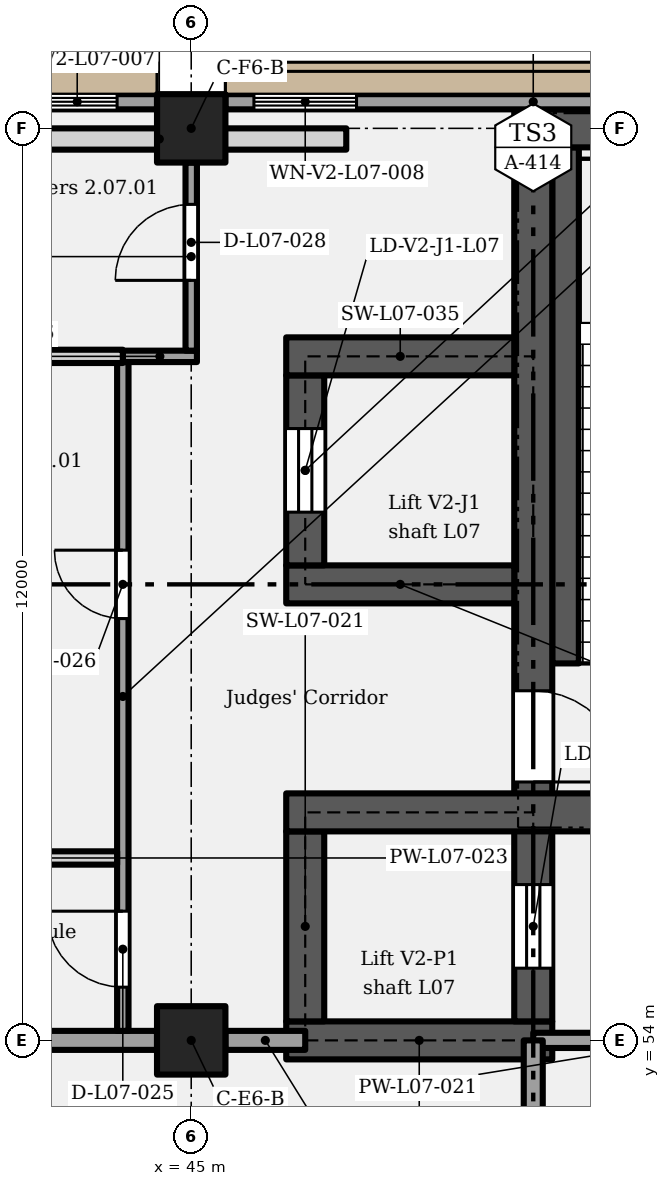
"""IFC4 building model, lengths in metres.
Left out: names, types, materials, properties, quantities, classifications, styles, units other than length and angle.
Written with IfcOpenShell. Run it as: python <this file> out.ifc"""

import sys

from ifc_helpers import new_model, si_unit, direction, frame, frame_2d, origin, origin_2d, place, context, subcontext, project, spatial, rectangle, extrude, element, fill, save


model = new_model("IFC4")
c1 = context("Model", 3, precision=1e-05, world=origin(), true_north=direction((0.0, 1.0)))
c2 = subcontext(c1, "Body", "Model", "MODEL_VIEW")
j1 = project(units=[si_unit("LENGTHUNIT", "METRE"), si_unit("PLANEANGLEUNIT", "RADIAN")], contexts=[c1])
p1 = place(None, origin())
s1 = spatial("IfcSite", under=j1, at=p1, CompositionType="ELEMENT")
p2 = place(p1, origin())
s2 = spatial("IfcBuilding", under=s1, at=p2, CompositionType="ELEMENT")
p3 = place(p2, frame((0.0, 0.0, 39.0)))
s3 = spatial("IfcBuildingStorey", under=s2, at=p3, CompositionType="ELEMENT", Elevation=39.0)
for number, where, z_axis, x_axis in (
    (1, (45.0, 54.0, 0.0), (0.0, 0.0, 1.0), (1.0, 0.0, 0.0)),
    (2, (45.0, 66.0, 0.0), (0.0, 0.0, 1.0), (1.0, 0.0, 0.0)),
):
    element("IfcColumn", number, at=place(p3, frame(where, z_axis=z_axis, x_axis=x_axis)), inside=s3, PredefinedType="COLUMN", context=c2, shape_type="SweptSolid", body=[
        extrude(rectangle(XDim=0.9, YDim=0.9, at=origin_2d()), origin(), (0.0, 0.0, 1.0), 5.4),
    ])
p4 = place(p3, frame((46.25, 54.0, 0.0), z_axis=(0.0, 0.0, 1.0), x_axis=(1.0, 0.0, 0.0)))
e3 = element("IfcWall", 3, at=p4, inside=s3, PredefinedType="SHEAR", context=c2, shape_type="SweptSolid", body=[
    extrude(rectangle(XDim=3.5, YDim=0.5, at=frame_2d((1.75, 0.0))), origin(), (0.0, 0.0, 1.0), 5.15),
])
p5 = place(p3, frame((46.5, 54.25, 0.0), z_axis=(0.0, 0.0, 1.0), x_axis=(0.0, 1.0, 0.0)))
e4 = element("IfcWall", 4, at=p5, inside=s3, PredefinedType="SHEAR", context=c2, shape_type="SweptSolid", body=[
    extrude(rectangle(XDim=2.5, YDim=0.5, at=frame_2d((1.25, 0.0))), origin(), (0.0, 0.0, 1.0), 5.15),
])
p6 = place(p3, frame((49.5, 54.25, 0.0), z_axis=(0.0, 0.0, 1.0), x_axis=(0.0, 1.0, 0.0)))
e5 = element("IfcWall", 5, at=p6, inside=s3, PredefinedType="SHEAR", context=c2, shape_type="SweptSolid", body=[
    extrude(rectangle(XDim=11.5, YDim=0.5, at=frame_2d((5.75, 0.0))), origin(), (0.0, 0.0, 1.0), 5.15),
])
p7 = place(p6, frame((0.7, 0.0, 0.0)))
e6 = element("IfcOpeningElement", 6, at=p7, cuts=e5, PredefinedType="OPENING", context=c2, shape_type="SweptSolid", body=[
    extrude(rectangle(XDim=1.1, YDim=2.1, at=frame_2d((0.55, 1.05))), frame((0.0, 0.26, 0.0), z_axis=(0.0, -1.0, 0.0), x_axis=(1.0, 0.0, 0.0)), (0.0, 0.0, 1.0), 0.52),
])
p8 = place(p6, frame((4.35, 0.0, 0.0), z_axis=(0.0, 0.0, 1.0), x_axis=(-1.0, 0.0, 0.0)))
e7 = element("IfcOpeningElement", 7, at=p8, cuts=e5, PredefinedType="OPENING", context=c2, shape_type="SweptSolid", body=[
    extrude(rectangle(XDim=1.2, YDim=2.1, at=frame_2d((0.6, 1.05))), frame((0.0, 0.26, 0.0), z_axis=(0.0, -1.0, 0.0), x_axis=(1.0, 0.0, 0.0)), (0.0, 0.0, 1.0), 0.52),
])
p9 = place(p3, frame((46.25, 57.0, 0.0), z_axis=(0.0, 0.0, 1.0), x_axis=(1.0, 0.0, 0.0)))
e8 = element("IfcWall", 8, at=p9, inside=s3, PredefinedType="SHEAR", context=c2, shape_type="SweptSolid", body=[
    extrude(rectangle(XDim=11.0, YDim=0.5, at=frame_2d((5.5, 0.0))), origin(), (0.0, 0.0, 1.0), 5.15),
])
p10 = place(p9, frame((4.9, 0.0, 0.0)))
e9 = element("IfcOpeningElement", 9, at=p10, cuts=e8, PredefinedType="OPENING", context=c2, shape_type="SweptSolid", body=[
    extrude(rectangle(XDim=1.2, YDim=2.1, at=frame_2d((0.6, 1.05))), frame((0.0, 0.26, 0.0), z_axis=(0.0, -1.0, 0.0), x_axis=(1.0, 0.0, 0.0)), (0.0, 0.0, 1.0), 0.52),
])
p11 = place(p3, frame((46.25, 60.0, 0.0), z_axis=(0.0, 0.0, 1.0), x_axis=(1.0, 0.0, 0.0)))
e10 = element("IfcWall", 10, at=p11, inside=s3, PredefinedType="SHEAR", context=c2, shape_type="SweptSolid", body=[
    extrude(rectangle(XDim=3.0, YDim=0.5, at=frame_2d((1.5, 0.0))), origin(), (0.0, 0.0, 1.0), 5.15),
])
p12 = place(p3, frame((46.5, 60.25, 0.0), z_axis=(0.0, 0.0, 1.0), x_axis=(0.0, 1.0, 0.0)))
e11 = element("IfcWall", 11, at=p12, inside=s3, PredefinedType="SHEAR", context=c2, shape_type="SweptSolid", body=[
    extrude(rectangle(XDim=2.5, YDim=0.5, at=frame_2d((1.25, 0.0))), origin(), (0.0, 0.0, 1.0), 5.15),
])
p13 = place(p12, frame((0.7, 0.0, 0.0)))
e12 = element("IfcOpeningElement", 12, at=p13, cuts=e11, PredefinedType="OPENING", context=c2, shape_type="SweptSolid", body=[
    extrude(rectangle(XDim=1.1, YDim=2.1, at=frame_2d((0.55, 1.05))), frame((0.0, 0.26, 0.0), z_axis=(0.0, -1.0, 0.0), x_axis=(1.0, 0.0, 0.0)), (0.0, 0.0, 1.0), 0.52),
])
p14 = place(p3, frame((46.25, 63.0, 0.0), z_axis=(0.0, 0.0, 1.0), x_axis=(1.0, 0.0, 0.0)))
e13 = element("IfcWall", 13, at=p14, inside=s3, PredefinedType="SHEAR", context=c2, shape_type="SweptSolid", body=[
    extrude(rectangle(XDim=3.0, YDim=0.5, at=frame_2d((1.5, 0.0))), origin(), (0.0, 0.0, 1.0), 5.15),
])
p15 = place(p3, frame((49.25, 66.0, 0.0), z_axis=(0.0, 0.0, 1.0), x_axis=(1.0, 0.0, 0.0)))
e14 = element("IfcWall", 14, at=p15, inside=s3, PredefinedType="SHEAR", context=c2, shape_type="SweptSolid", body=[
    extrude(rectangle(XDim=4.3, YDim=0.5, at=frame_2d((2.15, 0.0))), origin(), (0.0, 0.0, 1.0), 5.15),
])
p16 = place(p3, frame((36.45, 66.35, 0.0), z_axis=(0.0, 0.0, 1.0), x_axis=(1.0, 0.0, 0.0)))
e15 = element("IfcWall", 15, at=p16, inside=s3, PredefinedType="SOLIDWALL", context=c2, shape_type="SweptSolid", body=[
    extrude(rectangle(XDim=8.1, YDim=0.2, at=frame_2d((4.05, 0.0))), origin(), (0.0, 0.0, 1.0), 5.15),
])
p17 = place(p16, frame((6.525, 0.0, 1.05)))
e16 = element("IfcOpeningElement", 16, at=p17, cuts=e15, PredefinedType="OPENING", context=c2, shape_type="SweptSolid", body=[
    extrude(rectangle(XDim=1.05, YDim=2.4, at=frame_2d((0.525, 1.2))), frame((0.0, 0.11, 0.0), z_axis=(0.0, -1.0, 0.0), x_axis=(1.0, 0.0, 0.0)), (0.0, 0.0, 1.0), 0.22),
])
p18 = place(p3, frame((45.45, 66.35, 0.0), z_axis=(0.0, 0.0, 1.0), x_axis=(1.0, 0.0, 0.0)))
e17 = element("IfcWall", 17, at=p18, inside=s3, PredefinedType="SOLIDWALL", context=c2, shape_type="SweptSolid", body=[
    extrude(rectangle(XDim=8.1, YDim=0.2, at=frame_2d((4.05, 0.0))), origin(), (0.0, 0.0, 1.0), 5.15),
])
p19 = place(p18, frame((0.375, 0.0, 1.2)))
e18 = element("IfcOpeningElement", 18, at=p19, cuts=e17, PredefinedType="OPENING", context=c2, shape_type="SweptSolid", body=[
    extrude(rectangle(XDim=1.35, YDim=3.0, at=frame_2d((0.675, 1.5))), frame((0.0, 0.11, 0.0), z_axis=(0.0, -1.0, 0.0), x_axis=(1.0, 0.0, 0.0)), (0.0, 0.0, 1.0), 0.22),
])
p20 = place(p3, frame((42.12, 65.86, 5.4), z_axis=(0.0, 0.0, 1.0), x_axis=(1.0, 0.0, 0.0)))
e19 = element("IfcWall", 19, at=p20, inside=s3, PredefinedType="PARAPET", context=c2, shape_type="SweptSolid", body=[
    extrude(rectangle(XDim=4.92, YDim=0.28, at=frame_2d((2.46, 0.0))), origin(), (0.0, 0.0, 1.0), 1.4),
])
p21 = place(p3, frame((49.375, 57.0, 5.4), z_axis=(0.0, 0.0, 1.0), x_axis=(1.0, 0.0, 0.0)))
e20 = element("IfcWall", 20, at=p21, inside=s3, PredefinedType="SOLIDWALL", context=c2, shape_type="SweptSolid", body=[
    extrude(rectangle(XDim=4.75, YDim=0.25, at=frame_2d((2.375, 0.0))), origin(), (0.0, 0.0, 1.0), 3.1),
])
p22 = place(p21, frame((2.975, 0.0, 0.0), z_axis=(0.0, 0.0, 1.0), x_axis=(-1.0, 0.0, 0.0)))
e21 = element("IfcOpeningElement", 21, at=p22, cuts=e20, PredefinedType="OPENING", context=c2, shape_type="SweptSolid", body=[
    extrude(rectangle(XDim=1.2, YDim=2.1, at=frame_2d((0.6, 1.05))), frame((0.0, 0.135, 0.0), z_axis=(0.0, -1.0, 0.0), x_axis=(1.0, 0.0, 0.0)), (0.0, 0.0, 1.0), 0.27),
])
p23 = place(p3, frame((49.375, 66.0, 5.4), z_axis=(0.0, 0.0, 1.0), x_axis=(1.0, 0.0, 0.0)))
e22 = element("IfcWall", 22, at=p23, inside=s3, PredefinedType="SOLIDWALL", context=c2, shape_type="SweptSolid", body=[
    extrude(rectangle(XDim=4.75, YDim=0.25, at=frame_2d((2.375, 0.0))), origin(), (0.0, 0.0, 1.0), 3.1),
])
p24 = place(p23, frame((1.925, 0.0, 2.4)))
e23 = element("IfcOpeningElement", 23, at=p24, cuts=e22, PredefinedType="OPENING", context=c2, shape_type="SweptSolid", body=[
    extrude(rectangle(XDim=0.9, YDim=0.6, at=frame_2d((0.45, 0.3))), frame((0.0, 0.135, 0.0), z_axis=(0.0, -1.0, 0.0), x_axis=(1.0, 0.0, 0.0)), (0.0, 0.0, 1.0), 0.27),
])
p25 = place(p3, frame((49.5, 57.125, 5.4), z_axis=(0.0, 0.0, 1.0), x_axis=(0.0, 1.0, 0.0)))
e24 = element("IfcWall", 24, at=p25, inside=s3, PredefinedType="SOLIDWALL", context=c2, shape_type="SweptSolid", body=[
    extrude(rectangle(XDim=8.75, YDim=0.25, at=frame_2d((4.375, 0.0))), origin(), (0.0, 0.0, 1.0), 3.1),
])
p26 = place(p3, frame((40.5, 54.0, 0.0), z_axis=(0.0, 0.0, 1.0), x_axis=(1.0, 0.0, 0.0)))
e25 = element("IfcWall", 25, at=p26, inside=s3, PredefinedType="PARTITIONING", context=c2, shape_type="SweptSolid", body=[
    extrude(rectangle(XDim=4.05, YDim=0.25, at=frame_2d((2.025, 0.0))), origin(), (0.0, 0.0, 1.0), 4.4),
])
p27 = place(p26, frame((1.3, 0.0, 0.0)))
e26 = element("IfcOpeningElement", 26, at=p27, cuts=e25, PredefinedType="OPENING", context=c2, shape_type="SweptSolid", body=[
    extrude(rectangle(XDim=1.0, YDim=2.1, at=frame_2d((0.5, 1.05))), frame((0.0, 0.135, 0.0), z_axis=(0.0, -1.0, 0.0), x_axis=(1.0, 0.0, 0.0)), (0.0, 0.0, 1.0), 0.27),
])
p28 = place(p3, frame((45.45, 54.0, 0.0), z_axis=(0.0, 0.0, 1.0), x_axis=(1.0, 0.0, 0.0)))
e27 = element("IfcWall", 27, at=p28, inside=s3, PredefinedType="PARTITIONING", context=c2, shape_type="SweptSolid", body=[
    extrude(rectangle(XDim=1.05, YDim=0.25, at=frame_2d((0.525, 0.0))), origin(), (0.0, 0.0, 1.0), 4.4),
])
p29 = place(p3, frame((49.5, 54.0, 0.0), z_axis=(0.0, 0.0, 1.0), x_axis=(1.0, 0.0, 0.0)))
e28 = element("IfcWall", 28, at=p29, inside=s3, PredefinedType="PARTITIONING", context=c2, shape_type="SweptSolid", body=[
    extrude(rectangle(XDim=4.05, YDim=0.2, at=frame_2d((2.025, 0.0))), origin(), (0.0, 0.0, 1.0), 4.4),
])
p30 = place(p29, frame((1.35, 0.0, 0.0)))
e29 = element("IfcOpeningElement", 29, at=p30, cuts=e28, PredefinedType="OPENING", context=c2, shape_type="SweptSolid", body=[
    extrude(rectangle(XDim=1.8, YDim=2.1, at=frame_2d((0.9, 1.05))), frame((0.0, 0.11, 0.0), z_axis=(0.0, -1.0, 0.0), x_axis=(1.0, 0.0, 0.0)), (0.0, 0.0, 1.0), 0.22),
])
p31 = place(p3, frame((40.75, 56.4, 0.0), z_axis=(0.0, 0.0, 1.0), x_axis=(1.0, 0.0, 0.0)))
e30 = element("IfcWall", 30, at=p31, inside=s3, PredefinedType="PARTITIONING", context=c2, shape_type="SweptSolid", body=[
    extrude(rectangle(XDim=3.275, YDim=0.175, at=frame_2d((1.637, 0.0))), origin(), (0.0, 0.0, 1.0), 5.15),
])
p32 = place(p31, frame((2.0, 0.0, 0.0), z_axis=(0.0, 0.0, 1.0), x_axis=(-1.0, 0.0, 0.0)))
e31 = element("IfcOpeningElement", 31, at=p32, cuts=e30, PredefinedType="OPENING", context=c2, shape_type="SweptSolid", body=[
    extrude(rectangle(XDim=0.9, YDim=2.1, at=frame_2d((0.45, 1.05))), frame((0.0, 0.097, 0.0), z_axis=(0.0, -1.0, 0.0), x_axis=(1.0, 0.0, 0.0)), (0.0, 0.0, 1.0), 0.195),
])
p33 = place(p3, frame((40.75, 63.0, 0.0), z_axis=(0.0, 0.0, 1.0), x_axis=(1.0, 0.0, 0.0)))
e32 = element("IfcWall", 32, at=p33, inside=s3, PredefinedType="PARTITIONING", context=c2, shape_type="SweptSolid", body=[
    extrude(rectangle(XDim=3.35, YDim=0.175, at=frame_2d((1.675, 0.0))), origin(), (0.0, 0.0, 1.0), 5.15),
])
p34 = place(p3, frame((44.1, 63.0, 0.0), z_axis=(0.0, 0.0, 1.0), x_axis=(1.0, 0.0, 0.0)))
e33 = element("IfcWall", 33, at=p34, inside=s3, PredefinedType="PARTITIONING", context=c2, shape_type="SweptSolid", body=[
    extrude(rectangle(XDim=0.975, YDim=0.15, at=frame_2d((0.487, 0.0))), origin(), (0.0, 0.0, 1.0), 5.15),
])
p35 = place(p3, frame((44.1, 54.125, 0.0), z_axis=(0.0, 0.0, 1.0), x_axis=(0.0, 1.0, 0.0)))
e34 = element("IfcWall", 34, at=p35, inside=s3, PredefinedType="PARTITIONING", context=c2, shape_type="SweptSolid", body=[
    extrude(rectangle(XDim=8.8, YDim=0.15, at=frame_2d((4.4, 0.0))), origin(), (0.0, 0.0, 1.0), 5.15),
])
p36 = place(p35, frame((0.575, 0.0, 0.0)))
e35 = element("IfcOpeningElement", 35, at=p36, cuts=e34, PredefinedType="OPENING", context=c2, shape_type="SweptSolid", body=[
    extrude(rectangle(XDim=1.0, YDim=2.1, at=frame_2d((0.5, 1.05))), frame((0.0, 0.085, 0.0), z_axis=(0.0, -1.0, 0.0), x_axis=(1.0, 0.0, 0.0)), (0.0, 0.0, 1.0), 0.17),
])
p37 = place(p35, frame((5.425, 0.0, 0.0)))
e36 = element("IfcOpeningElement", 36, at=p37, cuts=e34, PredefinedType="OPENING", context=c2, shape_type="SweptSolid", body=[
    extrude(rectangle(XDim=0.9, YDim=2.1, at=frame_2d((0.45, 1.05))), frame((0.0, 0.085, 0.0), z_axis=(0.0, -1.0, 0.0), x_axis=(1.0, 0.0, 0.0)), (0.0, 0.0, 1.0), 0.17),
])
p38 = place(p3, frame((45.0, 63.075, 0.0), z_axis=(0.0, 0.0, 1.0), x_axis=(0.0, 1.0, 0.0)))
e37 = element("IfcWall", 37, at=p38, inside=s3, PredefinedType="PARTITIONING", context=c2, shape_type="SweptSolid", body=[
    extrude(rectangle(XDim=2.475, YDim=0.15, at=frame_2d((1.238, 0.0))), origin(), (0.0, 0.0, 1.0), 4.4),
])
p39 = place(p38, frame((0.925, 0.0, 0.0)))
e38 = element("IfcOpeningElement", 38, at=p39, cuts=e37, PredefinedType="OPENING", context=c2, shape_type="SweptSolid", body=[
    extrude(rectangle(XDim=1.0, YDim=2.1, at=frame_2d((0.5, 1.05))), frame((0.0, 0.085, 0.0), z_axis=(0.0, -1.0, 0.0), x_axis=(1.0, 0.0, 0.0)), (0.0, 0.0, 1.0), 0.17),
])
p40 = place(p3, frame((49.5, 37.5, 0.0), z_axis=(0.0, 0.0, 1.0), x_axis=(0.0, 1.0, 0.0)))
e39 = element("IfcWall", 39, at=p40, inside=s3, PredefinedType="PARTITIONING", context=c2, shape_type="SweptSolid", body=[
    extrude(rectangle(XDim=16.5, YDim=0.25, at=frame_2d((8.25, 0.0))), origin(), (0.0, 0.0, 1.0), 5.15),
])
p41 = place(p40, frame((3.9, 0.0, 0.0), z_axis=(0.0, 0.0, 1.0), x_axis=(-1.0, 0.0, 0.0)))
e40 = element("IfcOpeningElement", 40, at=p41, cuts=e39, PredefinedType="OPENING", context=c2, shape_type="SweptSolid", body=[
    extrude(rectangle(XDim=1.8, YDim=2.4, at=frame_2d((0.9, 1.2))), frame((0.0, 0.135, 0.0), z_axis=(0.0, -1.0, 0.0), x_axis=(1.0, 0.0, 0.0)), (0.0, 0.0, 1.0), 0.27),
])
p42 = place(p40, frame((14.9, 0.0, 0.0), z_axis=(0.0, 0.0, 1.0), x_axis=(-1.0, 0.0, 0.0)))
e41 = element("IfcOpeningElement", 41, at=p42, cuts=e39, PredefinedType="OPENING", context=c2, shape_type="SweptSolid", body=[
    extrude(rectangle(XDim=1.8, YDim=2.4, at=frame_2d((0.9, 1.2))), frame((0.0, 0.135, 0.0), z_axis=(0.0, -1.0, 0.0), x_axis=(1.0, 0.0, 0.0)), (0.0, 0.0, 1.0), 0.27),
])
p43 = place(p3, frame((49.925, 58.96, 0.0), z_axis=(0.0, 0.0, 1.0), x_axis=(0.0, 1.0, 0.0)))
e42 = element("IfcWall", 42, at=p43, inside=s3, PredefinedType="SHEAR", context=c2, shape_type="SweptSolid", body=[
    extrude(rectangle(XDim=6.79, YDim=0.35, at=frame_2d((3.395, 0.0))), origin(), (0.0, 0.0, 1.0), 2.587),
])
p44 = place(p17, origin())
e43 = element("IfcWindow", 43, at=p44, inside=s3, PartitioningType="SINGLE_PANEL", PredefinedType="WINDOW", context=c2, shape_type="SweptSolid", body=[
    extrude(rectangle(XDim=1.05, YDim=2.4, at=frame_2d((0.525, 1.2))), frame((0.0, 0.03, 0.0), z_axis=(0.0, -1.0, 0.0), x_axis=(1.0, 0.0, 0.0)), (0.0, 0.0, 1.0), 0.06),
])
fill(e16, e43)
p45 = place(p19, origin())
e44 = element("IfcWindow", 44, at=p45, inside=s3, PartitioningType="SINGLE_PANEL", PredefinedType="WINDOW", context=c2, shape_type="SweptSolid", body=[
    extrude(rectangle(XDim=1.35, YDim=3.0, at=frame_2d((0.675, 1.5))), frame((0.0, 0.03, 0.0), z_axis=(0.0, -1.0, 0.0), x_axis=(1.0, 0.0, 0.0)), (0.0, 0.0, 1.0), 0.06),
])
fill(e18, e44)
p46 = place(p7, origin())
e45 = element("IfcDoor", 45, at=p46, inside=s3, OperationType="SLIDING_TO_LEFT", PredefinedType="DOOR", context=c2, shape_type="SweptSolid", body=[
    extrude(rectangle(XDim=1.1, YDim=2.1, at=frame_2d((0.55, 1.05))), frame((0.0, 0.025, 0.0), z_axis=(0.0, -1.0, 0.0), x_axis=(1.0, 0.0, 0.0)), (0.0, 0.0, 1.0), 0.05),
])
fill(e6, e45)
p47 = place(p13, origin())
e46 = element("IfcDoor", 46, at=p47, inside=s3, OperationType="SLIDING_TO_LEFT", PredefinedType="DOOR", context=c2, shape_type="SweptSolid", body=[
    extrude(rectangle(XDim=1.1, YDim=2.1, at=frame_2d((0.55, 1.05))), frame((0.0, 0.025, 0.0), z_axis=(0.0, -1.0, 0.0), x_axis=(1.0, 0.0, 0.0)), (0.0, 0.0, 1.0), 0.05),
])
fill(e12, e46)
p48 = place(p8, origin())
e47 = element("IfcDoor", 47, at=p48, inside=s3, OperationType="SINGLE_SWING_RIGHT", PredefinedType="DOOR", context=c2, shape_type="SweptSolid", body=[
    extrude(rectangle(XDim=1.2, YDim=2.1, at=frame_2d((0.6, 1.05))), frame((0.0, 0.025, 0.0), z_axis=(0.0, -1.0, 0.0), x_axis=(1.0, 0.0, 0.0)), (0.0, 0.0, 1.0), 0.05),
])
fill(e7, e47)
p49 = place(p36, origin())
e48 = element("IfcDoor", 48, at=p49, inside=s3, OperationType="SINGLE_SWING_RIGHT", PredefinedType="DOOR", context=c2, shape_type="SweptSolid", body=[
    extrude(rectangle(XDim=1.0, YDim=2.1, at=frame_2d((0.5, 1.05))), frame((0.0, 0.025, 0.0), z_axis=(0.0, -1.0, 0.0), x_axis=(1.0, 0.0, 0.0)), (0.0, 0.0, 1.0), 0.05),
])
fill(e35, e48)
p50 = place(p37, origin())
e49 = element("IfcDoor", 49, at=p50, inside=s3, OperationType="SINGLE_SWING_RIGHT", PredefinedType="DOOR", context=c2, shape_type="SweptSolid", body=[
    extrude(rectangle(XDim=0.9, YDim=2.1, at=frame_2d((0.45, 1.05))), frame((0.0, 0.025, 0.0), z_axis=(0.0, -1.0, 0.0), x_axis=(1.0, 0.0, 0.0)), (0.0, 0.0, 1.0), 0.05),
])
fill(e36, e49)
p51 = place(p39, origin())
e50 = element("IfcDoor", 50, at=p51, inside=s3, OperationType="SINGLE_SWING_LEFT", PredefinedType="DOOR", context=c2, shape_type="SweptSolid", body=[
    extrude(rectangle(XDim=1.0, YDim=2.1, at=frame_2d((0.5, 1.05))), frame((0.0, 0.025, 0.0), z_axis=(0.0, -1.0, 0.0), x_axis=(1.0, 0.0, 0.0)), (0.0, 0.0, 1.0), 0.05),
])
fill(e38, e50)
save(model, sys.argv[1])
